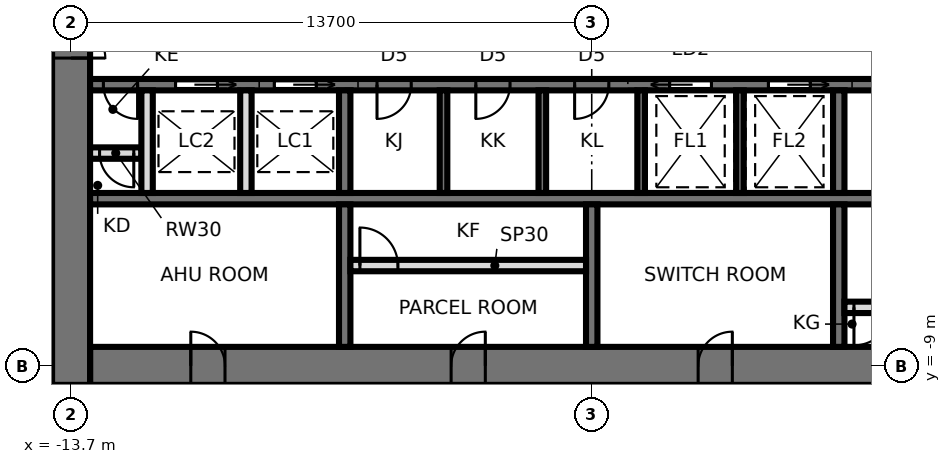
"""IFC4 building model, lengths in metres.
Left out: names, types, materials, properties, quantities, classifications, styles, units other than length and angle.
Written with IfcOpenShell. Run it as: python <this file> out.ifc"""

import sys

from ifc_helpers import new_model, si_unit, direction, frame, frame_2d, origin, place, context, subcontext, project, spatial, rectangle, extrude, element, fill, save


model = new_model("IFC4")
c1 = context("Model", 3, precision=1e-05, world=origin(), true_north=direction((0.0, 1.0)))
c2 = subcontext(c1, "Body", "Model", "MODEL_VIEW")
j1 = project(units=[si_unit("LENGTHUNIT", "METRE"), si_unit("PLANEANGLEUNIT", "RADIAN")], contexts=[c1])
p1 = place(None, origin())
s1 = spatial("IfcSite", under=j1, at=p1, CompositionType="ELEMENT")
p2 = place(p1, origin())
s2 = spatial("IfcBuilding", under=s1, at=p2, CompositionType="ELEMENT")
p3 = place(p2, frame((0.0, 0.0, 215.0)))
s3 = spatial("IfcBuildingStorey", under=s2, at=p3, CompositionType="ELEMENT", Elevation=215.0)
p4 = place(p3, frame((-13.2, -9.0, 0.0), z_axis=(0.0, 0.0, 1.0), x_axis=(1.0, 0.0, 0.0)))
e1 = element("IfcWall", 1, at=p4, inside=s3, PredefinedType="SHEAR", context=c2, shape_type="SweptSolid", body=[
    extrude(rectangle(XDim=26.4, YDim=1.0, at=frame_2d((13.2, 0.0))), origin(), (0.0, 0.0, 1.0), 3.9),
])
p5 = place(p4, frame((2.65, 0.0, 0.0)))
e2 = element("IfcOpeningElement", 2, at=p5, cuts=e1, PredefinedType="OPENING", context=c2, shape_type="SweptSolid", body=[
    extrude(rectangle(XDim=0.9, YDim=2.1, at=frame_2d((0.45, 1.05))), frame((0.0, 0.51, 0.0), z_axis=(0.0, -1.0, 0.0), x_axis=(1.0, 0.0, 0.0)), (0.0, 0.0, 1.0), 1.02),
])
p6 = place(p4, frame((9.5, 0.0, 0.0)))
e3 = element("IfcOpeningElement", 3, at=p6, cuts=e1, PredefinedType="OPENING", context=c2, shape_type="SweptSolid", body=[
    extrude(rectangle(XDim=0.9, YDim=2.1, at=frame_2d((0.45, 1.05))), frame((0.0, 0.51, 0.0), z_axis=(0.0, -1.0, 0.0), x_axis=(1.0, 0.0, 0.0)), (0.0, 0.0, 1.0), 1.02),
])
p7 = place(p4, frame((16.0, 0.0, 0.0)))
e4 = element("IfcOpeningElement", 4, at=p7, cuts=e1, PredefinedType="OPENING", context=c2, shape_type="SweptSolid", body=[
    extrude(rectangle(XDim=0.9, YDim=2.1, at=frame_2d((0.45, 1.05))), frame((0.0, 0.51, 0.0), z_axis=(0.0, -1.0, 0.0), x_axis=(1.0, 0.0, 0.0)), (0.0, 0.0, 1.0), 1.02),
])
p8 = place(p4, frame((22.85, 0.0, 0.0)))
e5 = element("IfcOpeningElement", 5, at=p8, cuts=e1, PredefinedType="OPENING", context=c2, shape_type="SweptSolid", body=[
    extrude(rectangle(XDim=0.9, YDim=2.1, at=frame_2d((0.45, 1.05))), frame((0.0, 0.51, 0.0), z_axis=(0.0, -1.0, 0.0), x_axis=(1.0, 0.0, 0.0)), (0.0, 0.0, 1.0), 1.02),
])
p9 = place(p3, frame((-13.7, 9.5, 0.0), z_axis=(0.0, 0.0, 1.0), x_axis=(0.0, -1.0, 0.0)))
e6 = element("IfcWall", 6, at=p9, inside=s3, PredefinedType="SHEAR", context=c2, shape_type="SweptSolid", body=[
    extrude(rectangle(XDim=19.0, YDim=1.0, at=frame_2d((9.5, 0.0))), origin(), (0.0, 0.0, 1.0), 3.9),
])
p10 = place(p9, frame((8.6, 0.0, 0.0)))
e7 = element("IfcOpeningElement", 7, at=p10, cuts=e6, PredefinedType="OPENING", context=c2, shape_type="SweptSolid", body=[
    extrude(rectangle(XDim=1.8, YDim=2.4, at=frame_2d((0.9, 1.2))), frame((0.0, 0.51, 0.0), z_axis=(0.0, -1.0, 0.0), x_axis=(1.0, 0.0, 0.0)), (0.0, 0.0, 1.0), 1.02),
])
p11 = place(p3, frame((-13.2, -1.6, 0.0), z_axis=(0.0, 0.0, 1.0), x_axis=(1.0, 0.0, 0.0)))
e8 = element("IfcWall", 8, at=p11, inside=s3, PredefinedType="SHEAR", context=c2, shape_type="SweptSolid", body=[
    extrude(rectangle(XDim=26.4, YDim=0.3, at=frame_2d((13.2, 0.0))), origin(), (0.0, 0.0, 1.0), 3.9),
])
p12 = place(p11, frame((25.15, 0.0, 0.0)))
e9 = element("IfcOpeningElement", 9, at=p12, cuts=e8, PredefinedType="OPENING", context=c2, shape_type="SweptSolid", body=[
    extrude(rectangle(XDim=1.0, YDim=2.1, at=frame_2d((0.5, 1.05))), frame((0.0, 0.16, 0.0), z_axis=(0.0, -1.0, 0.0), x_axis=(1.0, 0.0, 0.0)), (0.0, 0.0, 1.0), 0.32),
])
p13 = place(p11, frame((7.55, 0.0, 0.0)))
e10 = element("IfcOpeningElement", 10, at=p13, cuts=e8, PredefinedType="OPENING", context=c2, shape_type="SweptSolid", body=[
    extrude(rectangle(XDim=0.9, YDim=2.1, at=frame_2d((0.45, 1.05))), frame((0.0, 0.16, 0.0), z_axis=(0.0, -1.0, 0.0), x_axis=(1.0, 0.0, 0.0)), (0.0, 0.0, 1.0), 0.32),
])
p14 = place(p11, frame((10.15, 0.0, 0.0)))
e11 = element("IfcOpeningElement", 11, at=p14, cuts=e8, PredefinedType="OPENING", context=c2, shape_type="SweptSolid", body=[
    extrude(rectangle(XDim=0.9, YDim=2.1, at=frame_2d((0.45, 1.05))), frame((0.0, 0.16, 0.0), z_axis=(0.0, -1.0, 0.0), x_axis=(1.0, 0.0, 0.0)), (0.0, 0.0, 1.0), 0.32),
])
p15 = place(p11, frame((12.75, 0.0, 0.0)))
e12 = element("IfcOpeningElement", 12, at=p15, cuts=e8, PredefinedType="OPENING", context=c2, shape_type="SweptSolid", body=[
    extrude(rectangle(XDim=0.9, YDim=2.1, at=frame_2d((0.45, 1.05))), frame((0.0, 0.16, 0.0), z_axis=(0.0, -1.0, 0.0), x_axis=(1.0, 0.0, 0.0)), (0.0, 0.0, 1.0), 0.32),
])
p16 = place(p11, frame((15.25, 0.0, 0.0)))
e13 = element("IfcOpeningElement", 13, at=p16, cuts=e8, PredefinedType="OPENING", context=c2, shape_type="SweptSolid", body=[
    extrude(rectangle(XDim=1.1, YDim=2.3, at=frame_2d((0.55, 1.15))), frame((0.0, 0.16, 0.0), z_axis=(0.0, -1.0, 0.0), x_axis=(1.0, 0.0, 0.0)), (0.0, 0.0, 1.0), 0.32),
])
p17 = place(p11, frame((17.85, 0.0, 0.0)))
e14 = element("IfcOpeningElement", 14, at=p17, cuts=e8, PredefinedType="OPENING", context=c2, shape_type="SweptSolid", body=[
    extrude(rectangle(XDim=1.1, YDim=2.3, at=frame_2d((0.55, 1.15))), frame((0.0, 0.16, 0.0), z_axis=(0.0, -1.0, 0.0), x_axis=(1.0, 0.0, 0.0)), (0.0, 0.0, 1.0), 0.32),
])
p18 = place(p11, frame((4.85, 0.0, 0.0)))
e15 = element("IfcOpeningElement", 15, at=p18, cuts=e8, PredefinedType="OPENING", context=c2, shape_type="SweptSolid", body=[
    extrude(rectangle(XDim=1.1, YDim=2.3, at=frame_2d((0.55, 1.15))), frame((0.0, 0.16, 0.0), z_axis=(0.0, -1.0, 0.0), x_axis=(1.0, 0.0, 0.0)), (0.0, 0.0, 1.0), 0.32),
])
p19 = place(p11, frame((2.25, 0.0, 0.0)))
e16 = element("IfcOpeningElement", 16, at=p19, cuts=e8, PredefinedType="OPENING", context=c2, shape_type="SweptSolid", body=[
    extrude(rectangle(XDim=1.1, YDim=2.3, at=frame_2d((0.55, 1.15))), frame((0.0, 0.16, 0.0), z_axis=(0.0, -1.0, 0.0), x_axis=(1.0, 0.0, 0.0)), (0.0, 0.0, 1.0), 0.32),
])
p20 = place(p11, frame((0.35, 0.0, 0.0)))
e17 = element("IfcOpeningElement", 17, at=p20, cuts=e8, PredefinedType="OPENING", context=c2, shape_type="SweptSolid", body=[
    extrude(rectangle(XDim=0.9, YDim=2.1, at=frame_2d((0.45, 1.05))), frame((0.0, 0.16, 0.0), z_axis=(0.0, -1.0, 0.0), x_axis=(1.0, 0.0, 0.0)), (0.0, 0.0, 1.0), 0.32),
])
p21 = place(p3, frame((-13.2, -4.6, 0.0), z_axis=(0.0, 0.0, 1.0), x_axis=(1.0, 0.0, 0.0)))
e18 = element("IfcWall", 18, at=p21, inside=s3, PredefinedType="SHEAR", context=c2, shape_type="SweptSolid", body=[
    extrude(rectangle(XDim=26.4, YDim=0.3, at=frame_2d((13.2, 0.0))), origin(), (0.0, 0.0, 1.0), 3.9),
])
p22 = place(p3, frame((-6.5, -1.75, 0.0), z_axis=(0.0, 0.0, 1.0), x_axis=(0.0, -1.0, 0.0)))
e19 = element("IfcWall", 19, at=p22, inside=s3, PredefinedType="SHEAR", context=c2, shape_type="SweptSolid", body=[
    extrude(rectangle(XDim=2.7, YDim=0.3, at=frame_2d((1.35, 0.0))), origin(), (0.0, 0.0, 1.0), 3.9),
])
p23 = place(p3, frame((-6.5, -4.75, 0.0), z_axis=(0.0, 0.0, 1.0), x_axis=(0.0, -1.0, 0.0)))
e20 = element("IfcWall", 20, at=p23, inside=s3, PredefinedType="SHEAR", context=c2, shape_type="SweptSolid", body=[
    extrude(rectangle(XDim=3.75, YDim=0.3, at=frame_2d((1.875, 0.0))), origin(), (0.0, 0.0, 1.0), 3.9),
])
p24 = place(p3, frame((6.5, -1.75, 0.0), z_axis=(0.0, 0.0, 1.0), x_axis=(0.0, -1.0, 0.0)))
e21 = element("IfcWall", 21, at=p24, inside=s3, PredefinedType="SHEAR", context=c2, shape_type="SweptSolid", body=[
    extrude(rectangle(XDim=2.7, YDim=0.3, at=frame_2d((1.35, 0.0))), origin(), (0.0, 0.0, 1.0), 3.9),
])
p25 = place(p3, frame((6.5, -4.75, 0.0), z_axis=(0.0, 0.0, 1.0), x_axis=(0.0, -1.0, 0.0)))
e22 = element("IfcWall", 22, at=p25, inside=s3, PredefinedType="SHEAR", context=c2, shape_type="SweptSolid", body=[
    extrude(rectangle(XDim=3.75, YDim=0.3, at=frame_2d((1.875, 0.0))), origin(), (0.0, 0.0, 1.0), 3.9),
])
for number, where, z_axis, x_axis in (
    (23, (-3.9, -1.75, 0.0), (0.0, 0.0, 1.0), (0.0, -1.0, 0.0)),
    (24, (-1.3, -1.75, 0.0), (0.0, 0.0, 1.0), (0.0, -1.0, 0.0)),
    (25, (1.3, -1.75, 0.0), (0.0, 0.0, 1.0), (0.0, -1.0, 0.0)),
    (26, (3.9, -1.75, 0.0), (0.0, 0.0, 1.0), (0.0, -1.0, 0.0)),
):
    element("IfcWall", number, at=place(p3, frame(where, z_axis=z_axis, x_axis=x_axis)), inside=s3, PredefinedType="SHEAR", context=c2, shape_type="SweptSolid", body=[
        extrude(rectangle(XDim=2.7, YDim=0.2, at=frame_2d((1.35, 0.0))), origin(), (0.0, 0.0, 1.0), 3.9),
    ])
p26 = place(p3, frame((0.0, -4.75, 0.0), z_axis=(0.0, 0.0, 1.0), x_axis=(0.0, -1.0, 0.0)))
e27 = element("IfcWall", 27, at=p26, inside=s3, PredefinedType="SHEAR", context=c2, shape_type="SweptSolid", body=[
    extrude(rectangle(XDim=3.75, YDim=0.3, at=frame_2d((1.875, 0.0))), origin(), (0.0, 0.0, 1.0), 3.9),
])
p27 = place(p3, frame((-6.35, -6.36, 0.0), z_axis=(0.0, 0.0, 1.0), x_axis=(1.0, 0.0, 0.0)))
e28 = element("IfcWall", 28, at=p27, inside=s3, PredefinedType="PARTITIONING", context=c2, shape_type="SweptSolid", body=[
    extrude(rectangle(XDim=6.2, YDim=0.3, at=frame_2d((3.1, 0.0))), origin(), (0.0, 0.0, 1.0), 3.74),
])
p28 = place(p27, frame((0.25, 0.0, 0.0)))
e29 = element("IfcOpeningElement", 29, at=p28, cuts=e28, PredefinedType="OPENING", context=c2, shape_type="SweptSolid", body=[
    extrude(rectangle(XDim=1.0, YDim=2.4, at=frame_2d((0.5, 1.2))), frame((0.0, 0.16, 0.0), z_axis=(0.0, -1.0, 0.0), x_axis=(1.0, 0.0, 0.0)), (0.0, 0.0, 1.0), 0.32),
])
p29 = place(p3, frame((6.65, -7.46, 0.0), z_axis=(0.0, 0.0, 1.0), x_axis=(1.0, 0.0, 0.0)))
e30 = element("IfcWall", 30, at=p29, inside=s3, PredefinedType="PARTITIONING", context=c2, shape_type="SweptSolid", body=[
    extrude(rectangle(XDim=6.55, YDim=0.3, at=frame_2d((3.275, 0.0))), origin(), (0.0, 0.0, 1.0), 3.74),
])
p30 = place(p29, frame((0.25, 0.0, 0.0)))
e31 = element("IfcOpeningElement", 31, at=p30, cuts=e30, PredefinedType="OPENING", context=c2, shape_type="SweptSolid", body=[
    extrude(rectangle(XDim=1.0, YDim=2.4, at=frame_2d((0.5, 1.2))), frame((0.0, 0.16, 0.0), z_axis=(0.0, -1.0, 0.0), x_axis=(1.0, 0.0, 0.0)), (0.0, 0.0, 1.0), 0.32),
])
p31 = place(p3, frame((-13.2, -3.4, 0.0), z_axis=(0.0, 0.0, 1.0), x_axis=(1.0, 0.0, 0.0)))
e32 = element("IfcWall", 32, at=p31, inside=s3, PredefinedType="SOLIDWALL", context=c2, shape_type="SweptSolid", body=[
    extrude(rectangle(XDim=1.35, YDim=0.3, at=frame_2d((0.675, 0.0))), origin(), (0.0, 0.0, 1.0), 3.74),
])
p32 = place(p31, frame((0.25, 0.0, 0.0)))
e33 = element("IfcOpeningElement", 33, at=p32, cuts=e32, PredefinedType="OPENING", context=c2, shape_type="SweptSolid", body=[
    extrude(rectangle(XDim=0.9, YDim=2.1, at=frame_2d((0.45, 1.05))), frame((0.0, 0.16, 0.0), z_axis=(0.0, -1.0, 0.0), x_axis=(1.0, 0.0, 0.0)), (0.0, 0.0, 1.0), 0.32),
])
for number, where, z_axis, x_axis in (
    (34, (-9.1, -1.75, 0.0), (0.0, 0.0, 1.0), (0.0, -1.0, 0.0)),
    (35, (-11.7, -1.75, 0.0), (0.0, 0.0, 1.0), (0.0, -1.0, 0.0)),
):
    element("IfcWall", number, at=place(p3, frame(where, z_axis=z_axis, x_axis=x_axis)), inside=s3, PredefinedType="SOLIDWALL", context=c2, shape_type="SweptSolid", body=[
        extrude(rectangle(XDim=2.7, YDim=0.3, at=frame_2d((1.35, 0.0))), origin(), (0.0, 0.0, 1.0), 3.74),
    ])
p33 = place(p10, origin())
e36 = element("IfcDoor", 36, at=p33, inside=s3, OperationType="DOUBLE_DOOR_SINGLE_SWING", PredefinedType="DOOR", context=c2, shape_type="SweptSolid", body=[
    extrude(rectangle(XDim=1.72, YDim=2.36, at=frame_2d((0.9, 1.18))), frame((0.0, 0.025, 0.0), z_axis=(0.0, -1.0, 0.0), x_axis=(1.0, 0.0, 0.0)), (0.0, 0.0, 1.0), 0.05),
    extrude(rectangle(XDim=0.04, YDim=2.4, at=frame_2d((0.02, 1.2))), frame((0.0, 0.25, 0.0), z_axis=(0.0, -1.0, 0.0), x_axis=(1.0, 0.0, 0.0)), (0.0, 0.0, 1.0), 0.5),
    extrude(rectangle(XDim=0.04, YDim=2.4, at=frame_2d((1.78, 1.2))), frame((0.0, 0.25, 0.0), z_axis=(0.0, -1.0, 0.0), x_axis=(1.0, 0.0, 0.0)), (0.0, 0.0, 1.0), 0.5),
    extrude(rectangle(XDim=1.72, YDim=0.04, at=frame_2d((0.9, 2.38))), frame((0.0, 0.25, 0.0), z_axis=(0.0, -1.0, 0.0), x_axis=(1.0, 0.0, 0.0)), (0.0, 0.0, 1.0), 0.5),
])
fill(e7, e36)
p34 = place(p13, frame((0.9, 0.0, 0.0), z_axis=(0.0, 0.0, 1.0), x_axis=(-1.0, 0.0, 0.0)))
e37 = element("IfcDoor", 37, at=p34, inside=s3, OperationType="SINGLE_SWING_RIGHT", PredefinedType="DOOR", context=c2, shape_type="SweptSolid", body=[
    extrude(rectangle(XDim=0.9, YDim=2.1, at=frame_2d((0.45, 1.05))), frame((0.0, 0.025, 0.0), z_axis=(0.0, -1.0, 0.0), x_axis=(1.0, 0.0, 0.0)), (0.0, 0.0, 1.0), 0.05),
])
fill(e10, e37)
p35 = place(p14, frame((0.9, 0.0, 0.0), z_axis=(0.0, 0.0, 1.0), x_axis=(-1.0, 0.0, 0.0)))
e38 = element("IfcDoor", 38, at=p35, inside=s3, OperationType="SINGLE_SWING_RIGHT", PredefinedType="DOOR", context=c2, shape_type="SweptSolid", body=[
    extrude(rectangle(XDim=0.9, YDim=2.1, at=frame_2d((0.45, 1.05))), frame((0.0, 0.025, 0.0), z_axis=(0.0, -1.0, 0.0), x_axis=(1.0, 0.0, 0.0)), (0.0, 0.0, 1.0), 0.05),
])
fill(e11, e38)
p36 = place(p15, frame((0.9, 0.0, 0.0), z_axis=(0.0, 0.0, 1.0), x_axis=(-1.0, 0.0, 0.0)))
e39 = element("IfcDoor", 39, at=p36, inside=s3, OperationType="SINGLE_SWING_RIGHT", PredefinedType="DOOR", context=c2, shape_type="SweptSolid", body=[
    extrude(rectangle(XDim=0.9, YDim=2.1, at=frame_2d((0.45, 1.05))), frame((0.0, 0.025, 0.0), z_axis=(0.0, -1.0, 0.0), x_axis=(1.0, 0.0, 0.0)), (0.0, 0.0, 1.0), 0.05),
])
fill(e12, e39)
p37 = place(p16, frame((1.1, 0.0, 0.0), z_axis=(0.0, 0.0, 1.0), x_axis=(-1.0, 0.0, 0.0)))
e40 = element("IfcDoor", 40, at=p37, inside=s3, OperationType="SLIDING_TO_RIGHT", PredefinedType="DOOR", context=c2, shape_type="SweptSolid", body=[
    extrude(rectangle(XDim=1.1, YDim=2.3, at=frame_2d((0.55, 1.15))), frame((0.0, 0.025, 0.0), z_axis=(0.0, -1.0, 0.0), x_axis=(1.0, 0.0, 0.0)), (0.0, 0.0, 1.0), 0.05),
])
fill(e13, e40)
p38 = place(p17, frame((1.1, 0.0, 0.0), z_axis=(0.0, 0.0, 1.0), x_axis=(-1.0, 0.0, 0.0)))
e41 = element("IfcDoor", 41, at=p38, inside=s3, OperationType="SLIDING_TO_LEFT", PredefinedType="DOOR", context=c2, shape_type="SweptSolid", body=[
    extrude(rectangle(XDim=1.1, YDim=2.3, at=frame_2d((0.55, 1.15))), frame((0.0, 0.025, 0.0), z_axis=(0.0, -1.0, 0.0), x_axis=(1.0, 0.0, 0.0)), (0.0, 0.0, 1.0), 0.05),
])
fill(e14, e41)
p39 = place(p18, frame((1.1, 0.0, 0.0), z_axis=(0.0, 0.0, 1.0), x_axis=(-1.0, 0.0, 0.0)))
e42 = element("IfcDoor", 42, at=p39, inside=s3, OperationType="SLIDING_TO_LEFT", PredefinedType="DOOR", context=c2, shape_type="SweptSolid", body=[
    extrude(rectangle(XDim=1.1, YDim=2.3, at=frame_2d((0.55, 1.15))), frame((0.0, 0.025, 0.0), z_axis=(0.0, -1.0, 0.0), x_axis=(1.0, 0.0, 0.0)), (0.0, 0.0, 1.0), 0.05),
])
fill(e15, e42)
p40 = place(p19, frame((1.1, 0.0, 0.0), z_axis=(0.0, 0.0, 1.0), x_axis=(-1.0, 0.0, 0.0)))
e43 = element("IfcDoor", 43, at=p40, inside=s3, OperationType="SLIDING_TO_LEFT", PredefinedType="DOOR", context=c2, shape_type="SweptSolid", body=[
    extrude(rectangle(XDim=1.1, YDim=2.3, at=frame_2d((0.55, 1.15))), frame((0.0, 0.025, 0.0), z_axis=(0.0, -1.0, 0.0), x_axis=(1.0, 0.0, 0.0)), (0.0, 0.0, 1.0), 0.05),
])
fill(e16, e43)
p41 = place(p20, frame((0.9, 0.0, 0.0), z_axis=(0.0, 0.0, 1.0), x_axis=(-1.0, 0.0, 0.0)))
e44 = element("IfcDoor", 44, at=p41, inside=s3, OperationType="SINGLE_SWING_LEFT", PredefinedType="DOOR", context=c2, shape_type="SweptSolid", body=[
    extrude(rectangle(XDim=0.9, YDim=2.1, at=frame_2d((0.45, 1.05))), frame((0.0, 0.025, 0.0), z_axis=(0.0, -1.0, 0.0), x_axis=(1.0, 0.0, 0.0)), (0.0, 0.0, 1.0), 0.05),
])
fill(e17, e44)
p42 = place(p5, origin())
e45 = element("IfcDoor", 45, at=p42, inside=s3, OperationType="SINGLE_SWING_LEFT", PredefinedType="DOOR", context=c2, shape_type="SweptSolid", body=[
    extrude(rectangle(XDim=0.82, YDim=2.06, at=frame_2d((0.45, 1.03))), frame((0.0, 0.025, 0.0), z_axis=(0.0, -1.0, 0.0), x_axis=(1.0, 0.0, 0.0)), (0.0, 0.0, 1.0), 0.05),
    extrude(rectangle(XDim=0.04, YDim=2.1, at=frame_2d((0.02, 1.05))), frame((0.0, 0.25, 0.0), z_axis=(0.0, -1.0, 0.0), x_axis=(1.0, 0.0, 0.0)), (0.0, 0.0, 1.0), 0.5),
    extrude(rectangle(XDim=0.04, YDim=2.1, at=frame_2d((0.88, 1.05))), frame((0.0, 0.25, 0.0), z_axis=(0.0, -1.0, 0.0), x_axis=(1.0, 0.0, 0.0)), (0.0, 0.0, 1.0), 0.5),
    extrude(rectangle(XDim=0.82, YDim=0.04, at=frame_2d((0.45, 2.08))), frame((0.0, 0.25, 0.0), z_axis=(0.0, -1.0, 0.0), x_axis=(1.0, 0.0, 0.0)), (0.0, 0.0, 1.0), 0.5),
])
fill(e2, e45)
p43 = place(p6, origin())
e46 = element("IfcDoor", 46, at=p43, inside=s3, OperationType="SINGLE_SWING_RIGHT", PredefinedType="DOOR", context=c2, shape_type="SweptSolid", body=[
    extrude(rectangle(XDim=0.82, YDim=2.06, at=frame_2d((0.45, 1.03))), frame((0.0, 0.025, 0.0), z_axis=(0.0, -1.0, 0.0), x_axis=(1.0, 0.0, 0.0)), (0.0, 0.0, 1.0), 0.05),
    extrude(rectangle(XDim=0.04, YDim=2.1, at=frame_2d((0.02, 1.05))), frame((0.0, 0.25, 0.0), z_axis=(0.0, -1.0, 0.0), x_axis=(1.0, 0.0, 0.0)), (0.0, 0.0, 1.0), 0.5),
    extrude(rectangle(XDim=0.04, YDim=2.1, at=frame_2d((0.88, 1.05))), frame((0.0, 0.25, 0.0), z_axis=(0.0, -1.0, 0.0), x_axis=(1.0, 0.0, 0.0)), (0.0, 0.0, 1.0), 0.5),
    extrude(rectangle(XDim=0.82, YDim=0.04, at=frame_2d((0.45, 2.08))), frame((0.0, 0.25, 0.0), z_axis=(0.0, -1.0, 0.0), x_axis=(1.0, 0.0, 0.0)), (0.0, 0.0, 1.0), 0.5),
])
fill(e3, e46)
p44 = place(p7, origin())
e47 = element("IfcDoor", 47, at=p44, inside=s3, OperationType="SINGLE_SWING_RIGHT", PredefinedType="DOOR", context=c2, shape_type="SweptSolid", body=[
    extrude(rectangle(XDim=0.82, YDim=2.06, at=frame_2d((0.45, 1.03))), frame((0.0, 0.025, 0.0), z_axis=(0.0, -1.0, 0.0), x_axis=(1.0, 0.0, 0.0)), (0.0, 0.0, 1.0), 0.05),
    extrude(rectangle(XDim=0.04, YDim=2.1, at=frame_2d((0.02, 1.05))), frame((0.0, 0.25, 0.0), z_axis=(0.0, -1.0, 0.0), x_axis=(1.0, 0.0, 0.0)), (0.0, 0.0, 1.0), 0.5),
    extrude(rectangle(XDim=0.04, YDim=2.1, at=frame_2d((0.88, 1.05))), frame((0.0, 0.25, 0.0), z_axis=(0.0, -1.0, 0.0), x_axis=(1.0, 0.0, 0.0)), (0.0, 0.0, 1.0), 0.5),
    extrude(rectangle(XDim=0.82, YDim=0.04, at=frame_2d((0.45, 2.08))), frame((0.0, 0.25, 0.0), z_axis=(0.0, -1.0, 0.0), x_axis=(1.0, 0.0, 0.0)), (0.0, 0.0, 1.0), 0.5),
])
fill(e4, e47)
p45 = place(p28, origin())
e48 = element("IfcDoor", 48, at=p45, inside=s3, OperationType="SINGLE_SWING_LEFT", PredefinedType="DOOR", context=c2, shape_type="SweptSolid", body=[
    extrude(rectangle(XDim=1.0, YDim=2.4, at=frame_2d((0.5, 1.2))), frame((0.0, 0.025, 0.0), z_axis=(0.0, -1.0, 0.0), x_axis=(1.0, 0.0, 0.0)), (0.0, 0.0, 1.0), 0.05),
])
fill(e29, e48)
p46 = place(p30, frame((1.0, 0.0, 0.0), z_axis=(0.0, 0.0, 1.0), x_axis=(-1.0, 0.0, 0.0)))
e49 = element("IfcDoor", 49, at=p46, inside=s3, OperationType="SINGLE_SWING_RIGHT", PredefinedType="DOOR", context=c2, shape_type="SweptSolid", body=[
    extrude(rectangle(XDim=1.0, YDim=2.4, at=frame_2d((0.5, 1.2))), frame((0.0, 0.025, 0.0), z_axis=(0.0, -1.0, 0.0), x_axis=(1.0, 0.0, 0.0)), (0.0, 0.0, 1.0), 0.05),
])
fill(e31, e49)
p47 = place(p32, frame((0.9, 0.0, 0.0), z_axis=(0.0, 0.0, 1.0), x_axis=(-1.0, 0.0, 0.0)))
e50 = element("IfcDoor", 50, at=p47, inside=s3, OperationType="SINGLE_SWING_LEFT", PredefinedType="DOOR", context=c2, shape_type="SweptSolid", body=[
    extrude(rectangle(XDim=0.9, YDim=2.1, at=frame_2d((0.45, 1.05))), frame((0.0, 0.025, 0.0), z_axis=(0.0, -1.0, 0.0), x_axis=(1.0, 0.0, 0.0)), (0.0, 0.0, 1.0), 0.05),
])
fill(e33, e50)
save(model, sys.argv[1])
